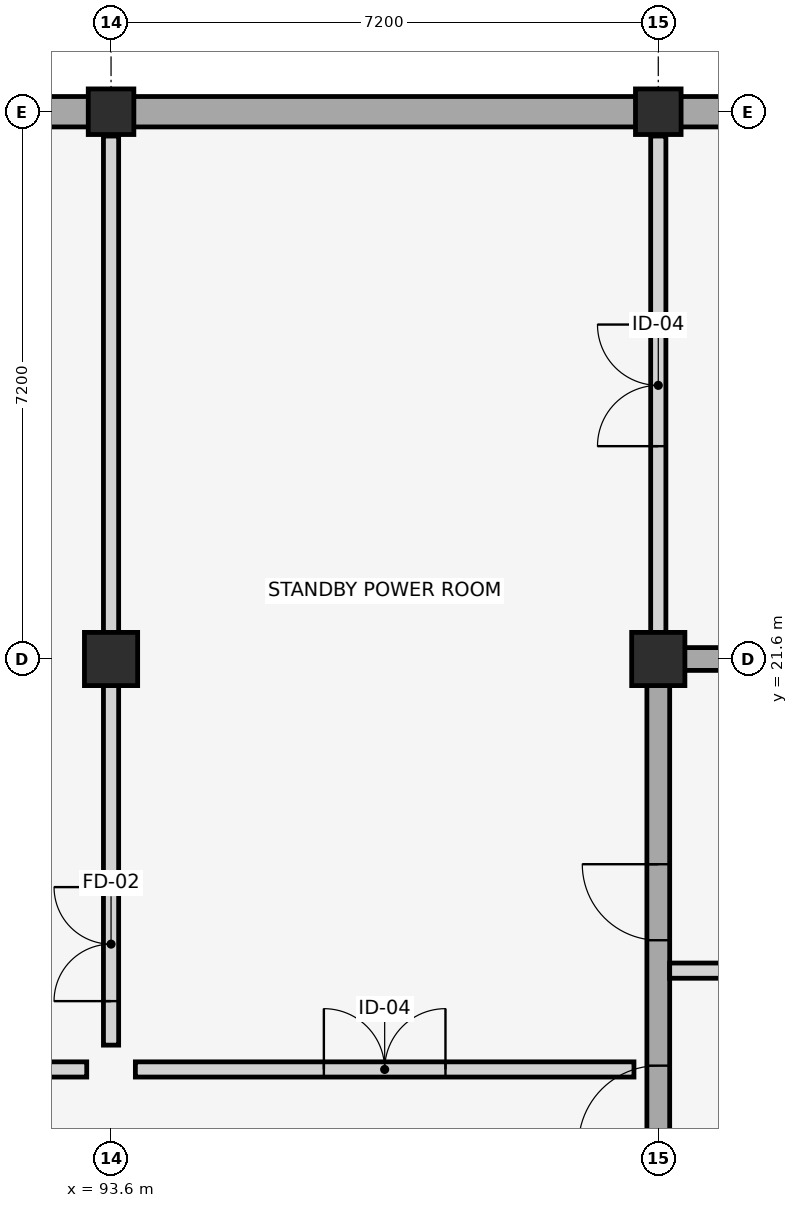
"""IFC4 building model, lengths in metres.
Left out: names, types, materials, properties, quantities, classifications, styles, units other than length and angle.
Written with IfcOpenShell. Run it as: python <this file> out.ifc"""

import sys

from ifc_helpers import new_model, si_unit, direction, frame, frame_2d, origin, origin_2d, place, context, subcontext, project, spatial, rectangle, extrude, element, fill, save


model = new_model("IFC4")
c1 = context("Model", 3, precision=1e-05, world=origin(), true_north=direction((0.0, 1.0)))
c2 = subcontext(c1, "Body", "Model", "MODEL_VIEW")
j1 = project(units=[si_unit("LENGTHUNIT", "METRE"), si_unit("PLANEANGLEUNIT", "RADIAN")], contexts=[c1])
p1 = place(None, origin())
s1 = spatial("IfcSite", under=j1, at=p1, CompositionType="ELEMENT")
p2 = place(p1, origin())
s2 = spatial("IfcBuilding", under=s1, at=p2, CompositionType="ELEMENT")
p3 = place(p2, frame((0.0, 0.0, -4.5)))
s3 = spatial("IfcBuildingStorey", under=s2, at=p3, CompositionType="ELEMENT", Elevation=-4.5)
p4 = place(p3, frame((108.2, 28.8, 0.0), z_axis=(0.0, 0.0, 1.0), x_axis=(-1.0, 0.0, 0.0)))
e1 = element("IfcWall", 1, at=p4, inside=s3, PredefinedType="USERDEFINED", context=c2, shape_type="SweptSolid", body=[
    extrude(rectangle(XDim=50.8, YDim=0.4, at=frame_2d((25.4, 0.0))), origin(), (0.0, 0.0, 1.0), 3.67),
])
p5 = place(p4, frame((24.3, 0.0, 0.0)))
e2 = element("IfcOpeningElement", 2, at=p5, cuts=e1, PredefinedType="OPENING", context=c2, shape_type="SweptSolid", body=[
    extrude(rectangle(XDim=1.8, YDim=2.4, at=frame_2d((0.9, 1.2))), frame((0.0, 0.21, 0.0), z_axis=(0.0, -1.0, 0.0), x_axis=(1.0, 0.0, 0.0)), (0.0, 0.0, 1.0), 0.42),
])
p6 = place(p3, frame((93.6, 21.6, -0.45), z_axis=(0.0, 0.0, 1.0), x_axis=(1.0, 0.0, 0.0)))
e3 = element("IfcColumn", 3, at=p6, inside=s3, PredefinedType="COLUMN", context=c2, shape_type="SweptSolid", body=[
    extrude(rectangle(XDim=0.7, YDim=0.7, at=origin_2d()), origin(), (0.0, 0.0, 1.0), 4.95),
])
p7 = place(p3, frame((93.6, 28.8, -0.45), z_axis=(0.0, 0.0, 1.0), x_axis=(0.0, 1.0, 0.0)))
e4 = element("IfcColumn", 4, at=p7, inside=s3, PredefinedType="COLUMN", context=c2, shape_type="SweptSolid", body=[
    extrude(rectangle(XDim=0.6, YDim=0.6, at=origin_2d()), origin(), (0.0, 0.0, 1.0), 4.95),
])
p8 = place(p3, frame((100.8, 21.6, -0.45), z_axis=(0.0, 0.0, 1.0), x_axis=(0.0, 1.0, 0.0)))
e5 = element("IfcColumn", 5, at=p8, inside=s3, PredefinedType="COLUMN", context=c2, shape_type="SweptSolid", body=[
    extrude(rectangle(XDim=0.7, YDim=0.7, at=origin_2d()), origin(), (0.0, 0.0, 1.0), 4.95),
])
p9 = place(p3, frame((100.8, 28.8, -0.45), z_axis=(0.0, 0.0, 1.0), x_axis=(1.0, 0.0, 0.0)))
e6 = element("IfcColumn", 6, at=p9, inside=s3, PredefinedType="COLUMN", context=c2, shape_type="SweptSolid", body=[
    extrude(rectangle(XDim=0.6, YDim=0.6, at=origin_2d()), origin(), (0.0, 0.0, 1.0), 4.95),
])
p10 = place(p3, frame((100.65, 21.6, 0.0), z_axis=(0.0, 0.0, 1.0), x_axis=(1.0, 0.0, 0.0)))
e7 = element("IfcWall", 7, at=p10, inside=s3, PredefinedType="SHEAR", context=c2, shape_type="SweptSolid", body=[
    extrude(rectangle(XDim=7.15, YDim=0.3, at=frame_2d((3.575, 0.0))), origin(), (0.0, 0.0, 1.0), 4.25),
])
p11 = place(p3, frame((100.8, 7.35, 0.0), z_axis=(0.0, 0.0, 1.0), x_axis=(0.0, 1.0, 0.0)))
e8 = element("IfcWall", 8, at=p11, inside=s3, PredefinedType="SHEAR", context=c2, shape_type="SweptSolid", body=[
    extrude(rectangle(XDim=14.1, YDim=0.3, at=frame_2d((7.05, 0.0))), origin(), (0.0, 0.0, 1.0), 4.25),
])
p12 = place(p11, frame((3.55, 0.0, 0.0)))
e9 = element("IfcOpeningElement", 9, at=p12, cuts=e8, PredefinedType="OPENING", context=c2, shape_type="SweptSolid", body=[
    extrude(rectangle(XDim=1.3, YDim=2.2, at=frame_2d((0.65, 1.1))), frame((0.0, 0.16, 0.0), z_axis=(0.0, -1.0, 0.0), x_axis=(1.0, 0.0, 0.0)), (0.0, 0.0, 1.0), 0.32),
])
p13 = place(p11, frame((7.85, 0.0, 0.0)))
e10 = element("IfcOpeningElement", 10, at=p13, cuts=e8, PredefinedType="OPENING", context=c2, shape_type="SweptSolid", body=[
    extrude(rectangle(XDim=1.05, YDim=2.15, at=frame_2d((0.525, 1.075))), frame((0.0, 0.16, 0.0), z_axis=(0.0, -1.0, 0.0), x_axis=(1.0, 0.0, 0.0)), (0.0, 0.0, 1.0), 0.32),
])
p14 = place(p11, frame((10.55, 0.0, 0.0)))
e11 = element("IfcOpeningElement", 11, at=p14, cuts=e8, PredefinedType="OPENING", context=c2, shape_type="SweptSolid", body=[
    extrude(rectangle(XDim=1.0, YDim=2.15, at=frame_2d((0.5, 1.075))), frame((0.0, 0.16, 0.0), z_axis=(0.0, -1.0, 0.0), x_axis=(1.0, 0.0, 0.0)), (0.0, 0.0, 1.0), 0.32),
])
p15 = place(p3, frame((100.95, 17.5, 0.0), z_axis=(0.0, 0.0, 1.0), x_axis=(1.0, 0.0, 0.0)))
e12 = element("IfcWall", 12, at=p15, inside=s3, PredefinedType="PLUMBINGWALL", context=c2, shape_type="SweptSolid", body=[
    extrude(rectangle(XDim=3.55, YDim=0.2, at=frame_2d((1.775, 0.0))), origin(), (0.0, 0.0, 1.0), 3.67),
])
p16 = place(p3, frame((65.12, 16.2, 0.0), z_axis=(0.0, 0.0, 1.0), x_axis=(1.0, 0.0, 0.0)))
e13 = element("IfcWall", 13, at=p16, inside=s3, PredefinedType="PARTITIONING", context=c2, shape_type="SweptSolid", body=[
    extrude(rectangle(XDim=28.16, YDim=0.2, at=frame_2d((14.08, 0.0))), origin(), (0.0, 0.0, 1.0), 3.45),
])
p17 = place(p16, frame((1.649, 0.0, 0.0)))
e14 = element("IfcOpeningElement", 14, at=p17, cuts=e13, PredefinedType="OPENING", context=c2, shape_type="SweptSolid", body=[
    extrude(rectangle(XDim=1.6, YDim=2.35, at=frame_2d((0.8, 1.175))), frame((0.0, 0.11, 0.0), z_axis=(0.0, -1.0, 0.0), x_axis=(1.0, 0.0, 0.0)), (0.0, 0.0, 1.0), 0.22),
])
p18 = place(p3, frame((93.92, 16.2, 0.0), z_axis=(0.0, 0.0, 1.0), x_axis=(1.0, 0.0, 0.0)))
e15 = element("IfcWall", 15, at=p18, inside=s3, PredefinedType="PARTITIONING", context=c2, shape_type="SweptSolid", body=[
    extrude(rectangle(XDim=6.56, YDim=0.2, at=frame_2d((3.28, 0.0))), origin(), (0.0, 0.0, 1.0), 3.45),
])
p19 = place(p18, frame((2.48, 0.0, 0.0)))
e16 = element("IfcOpeningElement", 16, at=p19, cuts=e15, PredefinedType="OPENING", context=c2, shape_type="SweptSolid", body=[
    extrude(rectangle(XDim=1.6, YDim=2.35, at=frame_2d((0.8, 1.175))), frame((0.0, 0.11, 0.0), z_axis=(0.0, -1.0, 0.0), x_axis=(1.0, 0.0, 0.0)), (0.0, 0.0, 1.0), 0.22),
])
p20 = place(p3, frame((93.6, 16.52, 0.0), z_axis=(0.0, 0.0, 1.0), x_axis=(0.0, 1.0, 0.0)))
e17 = element("IfcWall", 17, at=p20, inside=s3, PredefinedType="PARTITIONING", context=c2, shape_type="SweptSolid", body=[
    extrude(rectangle(XDim=11.96, YDim=0.2, at=frame_2d((5.98, 0.0))), origin(), (0.0, 0.0, 1.0), 3.45),
])
p21 = place(p20, frame((0.579, 0.0, 0.0)))
e18 = element("IfcOpeningElement", 18, at=p21, cuts=e17, PredefinedType="OPENING", context=c2, shape_type="SweptSolid", body=[
    extrude(rectangle(XDim=1.5, YDim=2.25, at=frame_2d((0.75, 1.125))), frame((0.0, 0.11, 0.0), z_axis=(0.0, -1.0, 0.0), x_axis=(1.0, 0.0, 0.0)), (0.0, 0.0, 1.0), 0.22),
])
p22 = place(p3, frame((100.8, 21.92, 0.0), z_axis=(0.0, 0.0, 1.0), x_axis=(0.0, 1.0, 0.0)))
e19 = element("IfcWall", 19, at=p22, inside=s3, PredefinedType="PARTITIONING", context=c2, shape_type="SweptSolid", body=[
    extrude(rectangle(XDim=6.56, YDim=0.2, at=frame_2d((3.28, 0.0))), origin(), (0.0, 0.0, 1.0), 3.45),
])
p23 = place(p22, frame((2.48, 0.0, 0.0)))
e20 = element("IfcOpeningElement", 20, at=p23, cuts=e19, PredefinedType="OPENING", context=c2, shape_type="SweptSolid", body=[
    extrude(rectangle(XDim=1.6, YDim=2.35, at=frame_2d((0.8, 1.175))), frame((0.0, 0.11, 0.0), z_axis=(0.0, -1.0, 0.0), x_axis=(1.0, 0.0, 0.0)), (0.0, 0.0, 1.0), 0.22),
])
p24 = place(p13, origin())
e21 = element("IfcDoor", 21, at=p24, inside=s3, OperationType="SINGLE_SWING_LEFT", PredefinedType="DOOR", context=c2, shape_type="SweptSolid", body=[
    extrude(rectangle(XDim=1.05, YDim=2.15, at=frame_2d((0.525, 1.075))), frame((0.0, 0.025, 0.0), z_axis=(0.0, -1.0, 0.0), x_axis=(1.0, 0.0, 0.0)), (0.0, 0.0, 1.0), 0.05),
])
fill(e10, e21)
p25 = place(p14, origin())
e22 = element("IfcDoor", 22, at=p25, inside=s3, OperationType="SINGLE_SWING_RIGHT", PredefinedType="DOOR", context=c2, shape_type="SweptSolid", body=[
    extrude(rectangle(XDim=1.0, YDim=2.15, at=frame_2d((0.5, 1.075))), frame((0.0, 0.025, 0.0), z_axis=(0.0, -1.0, 0.0), x_axis=(1.0, 0.0, 0.0)), (0.0, 0.0, 1.0), 0.05),
])
fill(e11, e22)
p26 = place(p19, origin())
e23 = element("IfcDoor", 23, at=p26, inside=s3, OperationType="DOUBLE_DOOR_SINGLE_SWING", PredefinedType="DOOR", context=c2, shape_type="SweptSolid", body=[
    extrude(rectangle(XDim=1.6, YDim=2.35, at=frame_2d((0.8, 1.175))), frame((0.0, 0.025, 0.0), z_axis=(0.0, -1.0, 0.0), x_axis=(1.0, 0.0, 0.0)), (0.0, 0.0, 1.0), 0.05),
])
fill(e16, e23)
p27 = place(p21, origin())
e24 = element("IfcDoor", 24, at=p27, inside=s3, OperationType="DOUBLE_DOOR_SINGLE_SWING", PredefinedType="DOOR", context=c2, shape_type="SweptSolid", body=[
    extrude(rectangle(XDim=1.5, YDim=2.25, at=frame_2d((0.75, 1.125))), frame((0.0, 0.025, 0.0), z_axis=(0.0, -1.0, 0.0), x_axis=(1.0, 0.0, 0.0)), (0.0, 0.0, 1.0), 0.05),
])
fill(e18, e24)
p28 = place(p23, origin())
e25 = element("IfcDoor", 25, at=p28, inside=s3, OperationType="DOUBLE_DOOR_SINGLE_SWING", PredefinedType="DOOR", context=c2, shape_type="SweptSolid", body=[
    extrude(rectangle(XDim=1.6, YDim=2.35, at=frame_2d((0.8, 1.175))), frame((0.0, 0.025, 0.0), z_axis=(0.0, -1.0, 0.0), x_axis=(1.0, 0.0, 0.0)), (0.0, 0.0, 1.0), 0.05),
])
fill(e20, e25)
save(model, sys.argv[1])
